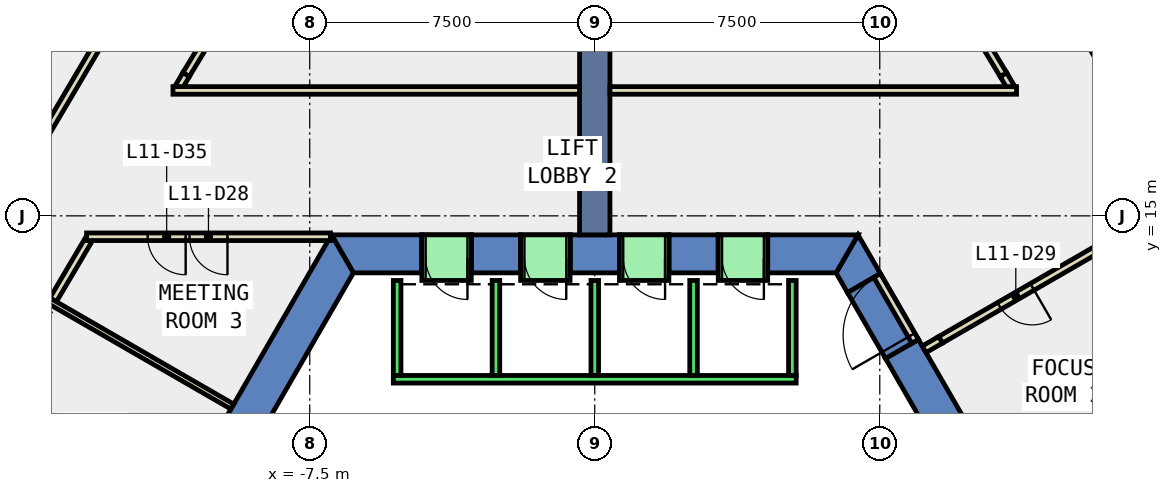
"""IFC4 building model, lengths in metres.
Left out: names, types, materials, properties, quantities, classifications, styles, units other than length and angle.
Written with IfcOpenShell. Run it as: python <this file> out.ifc"""

import sys

from ifc_helpers import new_model, si_unit, direction, frame, frame_2d, origin, place, context, subcontext, project, spatial, polyline, rectangle, outline, extrude, element, fill, save


model = new_model("IFC4")
c1 = context("Model", 3, precision=1e-05, world=origin(), true_north=direction((0.0, 1.0)))
c2 = subcontext(c1, "Body", "Model", "MODEL_VIEW")
j1 = project(units=[si_unit("LENGTHUNIT", "METRE"), si_unit("PLANEANGLEUNIT", "RADIAN")], contexts=[c1])
p1 = place(None, origin())
s1 = spatial("IfcSite", under=j1, at=p1, CompositionType="ELEMENT")
p2 = place(p1, origin())
s2 = spatial("IfcBuilding", under=s1, at=p2, CompositionType="ELEMENT")
p3 = place(p2, frame((0.0, 0.0, 56.0)))
s3 = spatial("IfcBuildingStorey", under=s2, at=p3, CompositionType="ELEMENT", Elevation=56.0)
p4 = place(p3, frame((0.0, 0.0, -0.4)))
e1 = element("IfcWall", 1, at=p4, inside=s3, PredefinedType="SHEAR", context=c2, shape_type="SweptSolid", body=[
    extrude(outline(polyline([(8.517, 11.748), (7.651, 11.248), (12.702, 2.5), (13.856, 2.5), (8.517, 11.748)])), origin(), (0.0, 0.0, 1.0), 4.2),
])
p5 = place(p3, frame((0.0, 0.0, -0.4)))
e2 = element("IfcWall", 2, at=p5, inside=s3, PredefinedType="SHEAR", context=c2, shape_type="SweptSolid", body=[
    extrude(outline(polyline([(6.651, 12.98), (7.517, 13.48), (6.928, 14.5), (6.351, 13.5), (6.651, 12.98)])), origin(), (0.0, 0.0, 1.0), 4.2),
])
p6 = place(p3, frame((0.0, 0.0, 3.6)))
e3 = element("IfcWall", 3, at=p6, inside=s3, PredefinedType="SHEAR", context=c2, shape_type="SweptSolid", body=[
    extrude(outline(polyline([(7.517, 13.48), (6.651, 12.98), (7.651, 11.248), (8.517, 11.748), (7.517, 13.48)])), origin(), (0.0, 0.0, 1.0), 0.2),
])
p7 = place(p3, frame((0.0, 0.0, -0.4)))
e4 = element("IfcWall", 4, at=p7, inside=s3, PredefinedType="SHEAR", context=c2, shape_type="SweptSolid", body=[
    extrude(outline(polyline([(4.55, 14.5), (4.55, 13.5), (6.351, 13.5), (6.928, 14.5), (4.55, 14.5)])), origin(), (0.0, 0.0, 1.0), 4.2),
])
p8 = place(p3, frame((0.0, 0.0, -0.4)))
e5 = element("IfcWall", 5, at=p8, inside=s3, PredefinedType="SHEAR", context=c2, shape_type="SweptSolid", body=[
    extrude(outline(polyline([(1.95, 14.5), (1.95, 13.5), (3.25, 13.5), (3.25, 14.5), (1.95, 14.5)])), origin(), (0.0, 0.0, 1.0), 4.2),
])
p9 = place(p3, frame((0.0, 0.0, -0.4)))
e6 = element("IfcWall", 6, at=p9, inside=s3, PredefinedType="SHEAR", context=c2, shape_type="SweptSolid", body=[
    extrude(outline(polyline([(-0.65, 14.5), (-0.65, 13.5), (0.65, 13.5), (0.65, 14.5), (-0.65, 14.5)])), origin(), (0.0, 0.0, 1.0), 4.2),
])
p10 = place(p3, frame((0.0, 0.0, -0.4)))
e7 = element("IfcWall", 7, at=p10, inside=s3, PredefinedType="SHEAR", context=c2, shape_type="SweptSolid", body=[
    extrude(outline(polyline([(-3.25, 14.5), (-3.25, 13.5), (-1.95, 13.5), (-1.95, 14.5), (-3.25, 14.5)])), origin(), (0.0, 0.0, 1.0), 4.2),
])
p11 = place(p3, frame((0.0, 0.0, -0.4)))
e8 = element("IfcWall", 8, at=p11, inside=s3, PredefinedType="SHEAR", context=c2, shape_type="SweptSolid", body=[
    extrude(outline(polyline([(-4.55, 13.5), (-4.55, 14.5), (-6.928, 14.5), (-6.351, 13.5), (-4.55, 13.5)])), origin(), (0.0, 0.0, 1.0), 4.2),
])
p12 = place(p3, frame((0.0, 0.0, 3.6)))
e9 = element("IfcWall", 9, at=p12, inside=s3, PredefinedType="SHEAR", context=c2, shape_type="SweptSolid", body=[
    extrude(outline(polyline([(3.25, 14.5), (3.25, 13.5), (4.55, 13.5), (4.55, 14.5), (3.25, 14.5)])), origin(), (0.0, 0.0, 1.0), 0.2),
])
p13 = place(p3, frame((0.0, 0.0, 3.6)))
e10 = element("IfcWall", 10, at=p13, inside=s3, PredefinedType="SHEAR", context=c2, shape_type="SweptSolid", body=[
    extrude(outline(polyline([(0.65, 14.5), (0.65, 13.5), (1.95, 13.5), (1.95, 14.5), (0.65, 14.5)])), origin(), (0.0, 0.0, 1.0), 0.2),
])
p14 = place(p3, frame((0.0, 0.0, 3.6)))
e11 = element("IfcWall", 11, at=p14, inside=s3, PredefinedType="SHEAR", context=c2, shape_type="SweptSolid", body=[
    extrude(outline(polyline([(-1.95, 14.5), (-1.95, 13.5), (-0.65, 13.5), (-0.65, 14.5), (-1.95, 14.5)])), origin(), (0.0, 0.0, 1.0), 0.2),
])
p15 = place(p3, frame((0.0, 0.0, 3.6)))
e12 = element("IfcWall", 12, at=p15, inside=s3, PredefinedType="SHEAR", context=c2, shape_type="SweptSolid", body=[
    extrude(outline(polyline([(-4.55, 14.5), (-4.55, 13.5), (-3.25, 13.5), (-3.25, 14.5), (-4.55, 14.5)])), origin(), (0.0, 0.0, 1.0), 0.2),
])
p16 = place(p3, frame((0.0, 0.0, -0.4)))
e13 = element("IfcWall", 13, at=p16, inside=s3, PredefinedType="SHEAR", context=c2, shape_type="SweptSolid", body=[
    extrude(outline(polyline([(-12.267, 5.252), (-11.402, 4.752), (-6.351, 13.5), (-6.928, 14.5), (-12.267, 5.252)])), origin(), (0.0, 0.0, 1.0), 4.2),
])
p17 = place(p3, frame((0.0, 14.5, -0.4), z_axis=(0.0, 0.0, 1.0), x_axis=(0.0, 1.0, 0.0)))
e14 = element("IfcWall", 14, at=p17, inside=s3, PredefinedType="SHEAR", context=c2, shape_type="SweptSolid", body=[
    extrude(rectangle(XDim=9.0, YDim=0.8, at=frame_2d((4.5, 0.0))), origin(), (0.0, 0.0, 1.0), 4.2),
])
p18 = place(p3, frame((-13.323, 14.364, 0.0), z_axis=(0.0, 0.0, 1.0), x_axis=(-0.508274698505, -0.861195001646, 0.0)))
e15 = element("IfcWall", 15, at=p18, inside=s3, PredefinedType="PARTITIONING", context=c2, shape_type="SweptSolid", body=[
    extrude(rectangle(XDim=1.828, YDim=0.2, at=frame_2d((0.914, 0.0))), origin(), (0.0, 0.0, 1.0), 3.8),
])
p19 = place(p3, frame((13.492, 14.274, 0.0), z_axis=(0.0, 0.0, 1.0), x_axis=(-0.866003598361, -0.5000377662, 0.0)))
e16 = element("IfcWall", 16, at=p19, inside=s3, PredefinedType="PARTITIONING", context=c2, shape_type="SweptSolid", body=[
    extrude(rectangle(XDim=5.071, YDim=0.2, at=frame_2d((2.536, 0.0))), origin(), (0.0, 0.0, 1.0), 3.8),
])
p20 = place(p19, frame((2.286, 0.0, 0.0)))
e17 = element("IfcOpeningElement", 17, at=p20, cuts=e16, PredefinedType="OPENING", context=c2, shape_type="SweptSolid", body=[
    extrude(rectangle(XDim=1.0, YDim=2.1, at=frame_2d((0.5, 1.05))), frame((0.0, 0.11, 0.0), z_axis=(0.0, -1.0, 0.0), x_axis=(1.0, 0.0, 0.0)), (0.0, 0.0, 1.0), 0.22),
])
p21 = place(p3, frame((10.948, 18.386, 0.0), z_axis=(0.0, 0.0, 1.0), x_axis=(-0.506880801681, 0.862016155815, 0.0)))
e18 = element("IfcWall", 18, at=p21, inside=s3, PredefinedType="PARTITIONING", context=c2, shape_type="SweptSolid", body=[
    extrude(rectangle(XDim=0.383, YDim=0.2, at=frame_2d((0.191, 0.0))), origin(), (0.0, 0.0, 1.0), 3.8),
])
p22 = place(p3, frame((10.754, 18.716, 0.0), z_axis=(0.0, 0.0, 1.0), x_axis=(-0.516755973305, 0.856132737403, 0.0)))
e19 = element("IfcWall", 19, at=p22, inside=s3, PredefinedType="PARTITIONING", context=c2, shape_type="SweptSolid", body=[
    extrude(rectangle(XDim=7.222, YDim=0.2, at=frame_2d((3.611, 0.0))), origin(), (0.0, 0.0, 1.0), 3.8),
])
p23 = place(p22, frame((3.111, 0.0, 0.0)))
e20 = element("IfcOpeningElement", 20, at=p23, cuts=e19, PredefinedType="OPENING", context=c2, shape_type="SweptSolid", body=[
    extrude(rectangle(XDim=1.0, YDim=2.1, at=frame_2d((0.5, 1.05))), frame((0.0, 0.11, 0.0), z_axis=(0.0, -1.0, 0.0), x_axis=(1.0, 0.0, 0.0)), (0.0, 0.0, 1.0), 0.22),
])
p24 = place(p3, frame((-7.022, 24.899, 0.0), z_axis=(0.0, 0.0, 1.0), x_axis=(-0.516755973305, -0.856132737403, 0.0)))
e21 = element("IfcWall", 21, at=p24, inside=s3, PredefinedType="PARTITIONING", context=c2, shape_type="SweptSolid", body=[
    extrude(rectangle(XDim=7.222, YDim=0.2, at=frame_2d((3.611, 0.0))), origin(), (0.0, 0.0, 1.0), 3.8),
])
p25 = place(p24, frame((3.111, 0.0, 0.0)))
e22 = element("IfcOpeningElement", 22, at=p25, cuts=e21, PredefinedType="OPENING", context=c2, shape_type="SweptSolid", body=[
    extrude(rectangle(XDim=1.0, YDim=2.1, at=frame_2d((0.5, 1.05))), frame((0.0, 0.11, 0.0), z_axis=(0.0, -1.0, 0.0), x_axis=(1.0, 0.0, 0.0)), (0.0, 0.0, 1.0), 0.22),
])
p26 = place(p3, frame((-10.754, 18.716, 0.0), z_axis=(0.0, 0.0, 1.0), x_axis=(-0.506880801681, -0.862016155815, 0.0)))
e23 = element("IfcWall", 23, at=p26, inside=s3, PredefinedType="PARTITIONING", context=c2, shape_type="SweptSolid", body=[
    extrude(rectangle(XDim=0.383, YDim=0.2, at=frame_2d((0.191, 0.0))), origin(), (0.0, 0.0, 1.0), 3.8),
])
p27 = place(p3, frame((12.815, 19.946, 0.0), z_axis=(0.0, 0.0, 1.0), x_axis=(0.508287536166, -0.861187424768, 0.0)))
e24 = element("IfcWall", 24, at=p27, inside=s3, PredefinedType="PARTITIONING", context=c2, shape_type="SweptSolid", body=[
    extrude(rectangle(XDim=7.169, YDim=0.2, at=frame_2d((3.584, 0.0))), origin(), (0.0, 0.0, 1.0), 3.8),
])
p28 = place(p3, frame((-14.618, 16.891, 0.0), z_axis=(0.0, 0.0, 1.0), x_axis=(0.508267810274, 0.861199067022, 0.0)))
e25 = element("IfcWall", 25, at=p28, inside=s3, PredefinedType="PARTITIONING", context=c2, shape_type="SweptSolid", body=[
    extrude(rectangle(XDim=3.547, YDim=0.2, at=frame_2d((1.774, 0.0))), origin(), (0.0, 0.0, 1.0), 3.8),
])
p29 = place(p3, frame((-14.377, 12.775, 0.0), z_axis=(0.0, 0.0, 1.0), x_axis=(0.866051730117, -0.499954398681, 0.0)))
e26 = element("IfcWall", 26, at=p29, inside=s3, PredefinedType="PARTITIONING", context=c2, shape_type="SweptSolid", body=[
    extrude(rectangle(XDim=5.588, YDim=0.15, at=frame_2d((2.794, 0.0))), origin(), (0.0, 0.0, 1.0), 3.8),
])
p30 = place(p3, frame((-6.957, 14.45, 0.0), z_axis=(0.0, 0.0, 1.0), x_axis=(-1.0, 0.0, 0.0)))
e27 = element("IfcWall", 27, at=p30, inside=s3, PredefinedType="PARTITIONING", context=c2, shape_type="SweptSolid", body=[
    extrude(rectangle(XDim=6.415, YDim=0.2, at=frame_2d((3.208, 0.0))), origin(), (0.0, 0.0, 1.0), 3.8),
])
p31 = place(p30, frame((2.708, 0.0, 0.0)))
e28 = element("IfcOpeningElement", 28, at=p31, cuts=e27, PredefinedType="OPENING", context=c2, shape_type="SweptSolid", body=[
    extrude(rectangle(XDim=1.0, YDim=2.1, at=frame_2d((0.5, 1.05))), frame((0.0, 0.11, 0.0), z_axis=(0.0, -1.0, 0.0), x_axis=(1.0, 0.0, 0.0)), (0.0, 0.0, 1.0), 0.22),
])
p32 = place(p30, frame((3.808, 0.0, 0.0)))
e29 = element("IfcOpeningElement", 29, at=p32, cuts=e27, PredefinedType="OPENING", context=c2, shape_type="SweptSolid", body=[
    extrude(rectangle(XDim=1.0, YDim=2.1, at=frame_2d((0.5, 1.05))), frame((0.0, 0.11, 0.0), z_axis=(0.0, -1.0, 0.0), x_axis=(1.0, 0.0, 0.0)), (0.0, 0.0, 1.0), 0.22),
])
p33 = place(p3, frame((16.104, 9.79, 0.0), z_axis=(0.0, 0.0, 1.0), x_axis=(-0.866023462144, -0.500003363005, 0.0)))
e30 = element("IfcWall", 30, at=p33, inside=s3, PredefinedType="PARTITIONING", context=c2, shape_type="SweptSolid", body=[
    extrude(rectangle(XDim=5.592, YDim=0.15, at=frame_2d((2.796, 0.0))), origin(), (0.0, 0.0, 1.0), 3.8),
])
for number, where, z_axis, x_axis in (
    (31, (0.4, 18.3, 0.0), (0.0, 0.0, 1.0), (1.0, 0.0, 0.0)),
    (32, (-11.099, 18.3, 0.0), (0.0, 0.0, 1.0), (1.0, 0.0, 0.0)),
):
    element("IfcWall", number, at=place(p3, frame(where, z_axis=z_axis, x_axis=x_axis)), inside=s3, PredefinedType="PARTITIONING", context=c2, shape_type="SweptSolid", body=[
        extrude(rectangle(XDim=10.699, YDim=0.2, at=frame_2d((5.35, 0.0))), origin(), (0.0, 0.0, 1.0), 3.8),
    ])
p34 = place(p3, frame((8.43, 11.698, 0.0), z_axis=(0.0, 0.0, 1.0), x_axis=(-0.50002537861, 0.866010750942, 0.0)))
e33 = element("IfcWall", 33, at=p34, inside=s3, PredefinedType="PARTITIONING", context=c2, shape_type="SweptSolid", body=[
    extrude(rectangle(XDim=2.0, YDim=0.2, at=frame_2d((1.0, 0.0))), origin(), (0.0, 0.0, 1.0), 2.4),
])
p35 = place(p34, frame((0.19, 0.0, 0.0)))
e34 = element("IfcOpeningElement", 34, at=p35, cuts=e33, PredefinedType="OPENING", context=c2, shape_type="SweptSolid", body=[
    extrude(rectangle(XDim=1.8, YDim=2.1, at=frame_2d((0.9, 1.05))), frame((0.0, 0.11, 0.0), z_axis=(0.0, -1.0, 0.0), x_axis=(1.0, 0.0, 0.0)), (0.0, 0.0, 1.0), 0.22),
])
p36 = place(p3, frame((9.1, 11.738, 0.0), z_axis=(0.0, 0.0, 1.0), x_axis=(-0.866071776036, -0.499919672301, 0.0)))
e35 = element("IfcWall", 35, at=p36, inside=s3, PredefinedType="PARTITIONING", context=c2, shape_type="SweptSolid", body=[
    extrude(rectangle(XDim=0.5, YDim=0.2, at=frame_2d((0.25, 0.0))), origin(), (0.0, 0.0, 1.0), 2.4),
])
p37 = place(p3, frame((5.3, 10.7, 0.0), z_axis=(0.0, 0.0, 1.0), x_axis=(-1.0, 0.0, 0.0)))
e36 = element("IfcWall", 36, at=p37, inside=s3, PredefinedType="STANDARD", context=c2, shape_type="SweptSolid", body=[
    extrude(rectangle(XDim=10.6, YDim=0.2, at=frame_2d((5.3, 0.0))), origin(), (0.0, 0.0, 1.0), 3.8),
])
for number, where, z_axis, x_axis in (
    (37, (5.2, 10.8, 0.0), (0.0, 0.0, 1.0), (0.0, 1.0, 0.0)),
    (38, (2.6, 10.8, 0.0), (0.0, 0.0, 1.0), (0.0, 1.0, 0.0)),
    (39, (0.0, 10.8, 0.0), (0.0, 0.0, 1.0), (0.0, 1.0, 0.0)),
    (40, (-2.6, 10.8, 0.0), (0.0, 0.0, 1.0), (0.0, 1.0, 0.0)),
    (41, (-5.2, 10.8, 0.0), (0.0, 0.0, 1.0), (0.0, 1.0, 0.0)),
):
    element("IfcWall", number, at=place(p3, frame(where, z_axis=z_axis, x_axis=x_axis)), inside=s3, PredefinedType="STANDARD", context=c2, shape_type="SweptSolid", body=[
        extrude(rectangle(XDim=2.5, YDim=0.2, at=frame_2d((1.25, 0.0))), origin(), (0.0, 0.0, 1.0), 3.8),
    ])
p38 = place(p3, frame((4.55, 13.9, 0.0), z_axis=(0.0, 0.0, 1.0), x_axis=(-1.0, 0.0, 0.0)))
e42 = element("IfcWall", 42, at=p38, inside=s3, PredefinedType="STANDARD", context=c2, shape_type="SweptSolid", body=[
    extrude(rectangle(XDim=1.3, YDim=1.2, at=frame_2d((0.65, 0.0))), origin(), (0.0, 0.0, 1.0), 2.4),
])
p39 = place(p38, frame((0.1, 0.0, 0.0)))
e43 = element("IfcOpeningElement", 43, at=p39, cuts=e42, PredefinedType="OPENING", context=c2, shape_type="SweptSolid", body=[
    extrude(rectangle(XDim=1.1, YDim=2.3, at=frame_2d((0.55, 1.15))), frame((0.0, 0.61, 0.0), z_axis=(0.0, -1.0, 0.0), x_axis=(1.0, 0.0, 0.0)), (0.0, 0.0, 1.0), 1.22),
])
p40 = place(p3, frame((1.95, 13.9, 0.0), z_axis=(0.0, 0.0, 1.0), x_axis=(-1.0, 0.0, 0.0)))
e44 = element("IfcWall", 44, at=p40, inside=s3, PredefinedType="STANDARD", context=c2, shape_type="SweptSolid", body=[
    extrude(rectangle(XDim=1.3, YDim=1.2, at=frame_2d((0.65, 0.0))), origin(), (0.0, 0.0, 1.0), 2.4),
])
p41 = place(p40, frame((0.1, 0.0, 0.0)))
e45 = element("IfcOpeningElement", 45, at=p41, cuts=e44, PredefinedType="OPENING", context=c2, shape_type="SweptSolid", body=[
    extrude(rectangle(XDim=1.1, YDim=2.3, at=frame_2d((0.55, 1.15))), frame((0.0, 0.61, 0.0), z_axis=(0.0, -1.0, 0.0), x_axis=(1.0, 0.0, 0.0)), (0.0, 0.0, 1.0), 1.22),
])
p42 = place(p3, frame((-0.65, 13.9, 0.0), z_axis=(0.0, 0.0, 1.0), x_axis=(-1.0, 0.0, 0.0)))
e46 = element("IfcWall", 46, at=p42, inside=s3, PredefinedType="STANDARD", context=c2, shape_type="SweptSolid", body=[
    extrude(rectangle(XDim=1.3, YDim=1.2, at=frame_2d((0.65, 0.0))), origin(), (0.0, 0.0, 1.0), 2.4),
])
p43 = place(p42, frame((0.1, 0.0, 0.0)))
e47 = element("IfcOpeningElement", 47, at=p43, cuts=e46, PredefinedType="OPENING", context=c2, shape_type="SweptSolid", body=[
    extrude(rectangle(XDim=1.1, YDim=2.3, at=frame_2d((0.55, 1.15))), frame((0.0, 0.61, 0.0), z_axis=(0.0, -1.0, 0.0), x_axis=(1.0, 0.0, 0.0)), (0.0, 0.0, 1.0), 1.22),
])
p44 = place(p3, frame((-3.25, 13.9, 0.0), z_axis=(0.0, 0.0, 1.0), x_axis=(-1.0, 0.0, 0.0)))
e48 = element("IfcWall", 48, at=p44, inside=s3, PredefinedType="STANDARD", context=c2, shape_type="SweptSolid", body=[
    extrude(rectangle(XDim=1.3, YDim=1.2, at=frame_2d((0.65, 0.0))), origin(), (0.0, 0.0, 1.0), 2.4),
])
p45 = place(p44, frame((0.1, 0.0, 0.0)))
e49 = element("IfcOpeningElement", 49, at=p45, cuts=e48, PredefinedType="OPENING", context=c2, shape_type="SweptSolid", body=[
    extrude(rectangle(XDim=1.1, YDim=2.3, at=frame_2d((0.55, 1.15))), frame((0.0, 0.61, 0.0), z_axis=(0.0, -1.0, 0.0), x_axis=(1.0, 0.0, 0.0)), (0.0, 0.0, 1.0), 1.22),
])
p46 = place(p31, origin())
e50 = element("IfcDoor", 50, at=p46, inside=s3, OperationType="SINGLE_SWING_LEFT", PredefinedType="DOOR", context=c2, shape_type="SweptSolid", body=[
    extrude(rectangle(XDim=1.0, YDim=2.1, at=frame_2d((0.5, 1.05))), frame((0.0, 0.025, 0.0), z_axis=(0.0, -1.0, 0.0), x_axis=(1.0, 0.0, 0.0)), (0.0, 0.0, 1.0), 0.05),
])
fill(e28, e50)
p47 = place(p20, origin())
e51 = element("IfcDoor", 51, at=p47, inside=s3, OperationType="SINGLE_SWING_LEFT", PredefinedType="DOOR", context=c2, shape_type="SweptSolid", body=[
    extrude(rectangle(XDim=1.0, YDim=2.1, at=frame_2d((0.5, 1.05))), frame((0.0, 0.025, 0.0), z_axis=(0.0, -1.0, 0.0), x_axis=(1.0, 0.0, 0.0)), (0.0, 0.0, 1.0), 0.05),
])
fill(e17, e51)
p48 = place(p32, origin())
e52 = element("IfcDoor", 52, at=p48, inside=s3, OperationType="SINGLE_SWING_RIGHT", PredefinedType="DOOR", context=c2, shape_type="SweptSolid", body=[
    extrude(rectangle(XDim=1.0, YDim=2.1, at=frame_2d((0.5, 1.05))), frame((0.0, 0.025, 0.0), z_axis=(0.0, -1.0, 0.0), x_axis=(1.0, 0.0, 0.0)), (0.0, 0.0, 1.0), 0.05),
])
fill(e29, e52)
p49 = place(p35, origin())
e53 = element("IfcDoor", 53, at=p49, inside=s3, OperationType="DOUBLE_DOOR_SINGLE_SWING", PredefinedType="DOOR", context=c2, shape_type="SweptSolid", body=[
    extrude(rectangle(XDim=1.8, YDim=2.1, at=frame_2d((0.9, 1.05))), frame((0.0, 0.025, 0.0), z_axis=(0.0, -1.0, 0.0), x_axis=(1.0, 0.0, 0.0)), (0.0, 0.0, 1.0), 0.05),
])
fill(e34, e53)
p50 = place(p39, origin())
e54 = element("IfcDoor", 54, at=p50, inside=s3, OperationType="SLIDING_TO_LEFT", PredefinedType="DOOR", context=c2, shape_type="SweptSolid", body=[
    extrude(rectangle(XDim=1.1, YDim=2.3, at=frame_2d((0.55, 1.15))), frame((0.0, 0.025, 0.0), z_axis=(0.0, -1.0, 0.0), x_axis=(1.0, 0.0, 0.0)), (0.0, 0.0, 1.0), 0.05),
])
fill(e43, e54)
p51 = place(p41, origin())
e55 = element("IfcDoor", 55, at=p51, inside=s3, OperationType="SLIDING_TO_LEFT", PredefinedType="DOOR", context=c2, shape_type="SweptSolid", body=[
    extrude(rectangle(XDim=1.1, YDim=2.3, at=frame_2d((0.55, 1.15))), frame((0.0, 0.025, 0.0), z_axis=(0.0, -1.0, 0.0), x_axis=(1.0, 0.0, 0.0)), (0.0, 0.0, 1.0), 0.05),
])
fill(e45, e55)
p52 = place(p43, origin())
e56 = element("IfcDoor", 56, at=p52, inside=s3, OperationType="SLIDING_TO_LEFT", PredefinedType="DOOR", context=c2, shape_type="SweptSolid", body=[
    extrude(rectangle(XDim=1.1, YDim=2.3, at=frame_2d((0.55, 1.15))), frame((0.0, 0.025, 0.0), z_axis=(0.0, -1.0, 0.0), x_axis=(1.0, 0.0, 0.0)), (0.0, 0.0, 1.0), 0.05),
])
fill(e47, e56)
p53 = place(p45, origin())
e57 = element("IfcDoor", 57, at=p53, inside=s3, OperationType="SLIDING_TO_LEFT", PredefinedType="DOOR", context=c2, shape_type="SweptSolid", body=[
    extrude(rectangle(XDim=1.1, YDim=2.3, at=frame_2d((0.55, 1.15))), frame((0.0, 0.025, 0.0), z_axis=(0.0, -1.0, 0.0), x_axis=(1.0, 0.0, 0.0)), (0.0, 0.0, 1.0), 0.05),
])
fill(e49, e57)
save(model, sys.argv[1])
